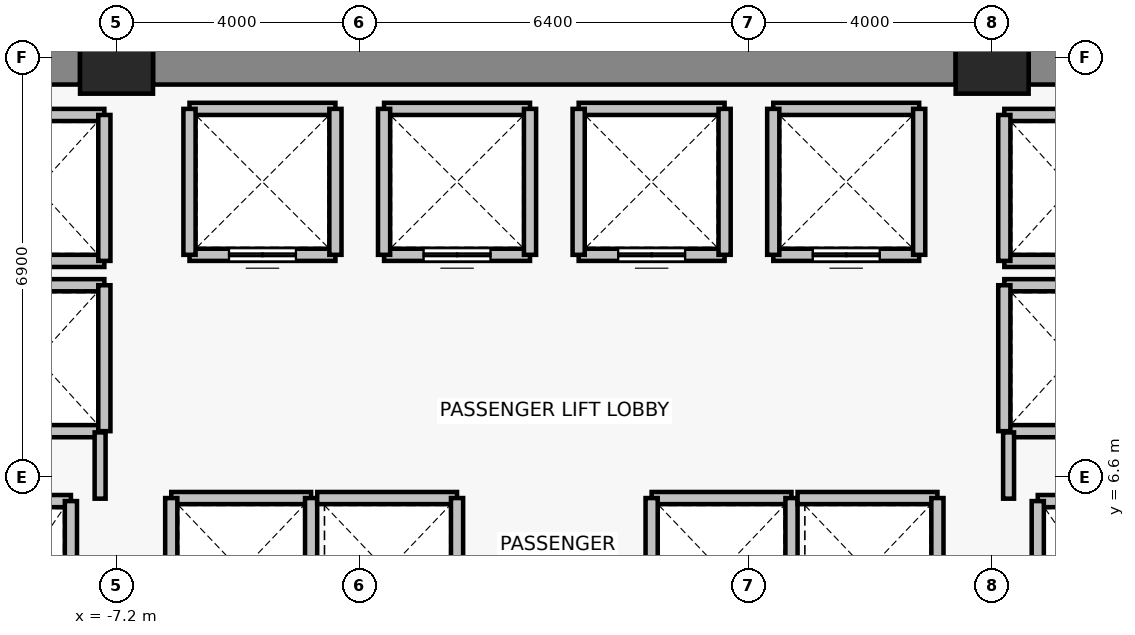
"""IFC4 building model, lengths in metres.
Left out: names, types, materials, properties, quantities, classifications, styles, units other than length and angle.
Written with IfcOpenShell. Run it as: python <this file> out.ifc"""

import sys

from ifc_helpers import new_model, si_unit, direction, frame, frame_2d, origin, origin_2d, place, context, subcontext, project, spatial, rectangle, extrude, source, transform, mapped, element, fill, save


model = new_model("IFC4")
c1 = context("Model", 3, precision=1e-05, world=origin(), true_north=direction((0.0, 1.0)))
c2 = subcontext(c1, "Body", "Model", "MODEL_VIEW")
j1 = project(units=[si_unit("LENGTHUNIT", "METRE"), si_unit("PLANEANGLEUNIT", "RADIAN")], contexts=[c1])
p1 = place(None, origin())
s1 = spatial("IfcSite", under=j1, at=p1, CompositionType="ELEMENT")
p2 = place(p1, origin())
s2 = spatial("IfcBuilding", under=s1, at=p2, CompositionType="ELEMENT")
p3 = place(p2, frame((0.0, 0.0, 67.0)))
s3 = spatial("IfcBuildingStorey", under=s2, at=p3, CompositionType="ELEMENT", Elevation=67.0)
for number, where, z_axis, x_axis in (
    (1, (-7.2, 13.5, 0.0), (0.0, 0.0, 1.0), (1.0, 0.0, 0.0)),
    (2, (7.2, 13.5, 0.0), (0.0, 0.0, 1.0), (1.0, 0.0, 0.0)),
):
    element("IfcColumn", number, at=place(p3, frame(where, z_axis=z_axis, x_axis=x_axis)), inside=s3, PredefinedType="COLUMN", context=c2, shape_type="SweptSolid", body=[
        extrude(rectangle(XDim=1.2, YDim=1.2, at=origin_2d()), origin(), (0.0, 0.0, 1.0), 3.3),
    ])
p4 = place(p3, frame((-13.8, 13.5, 0.0), z_axis=(0.0, 0.0, 1.0), x_axis=(1.0, 0.0, 0.0)))
e3 = element("IfcWall", 3, at=p4, inside=s3, PredefinedType="SHEAR", context=c2, shape_type="SweptSolid", body=[
    extrude(rectangle(XDim=6.0, YDim=0.9, at=frame_2d((3.0, 0.0))), origin(), (0.0, 0.0, 1.0), 3.075),
])
p5 = place(p3, frame((-6.6, 13.5, 0.0), z_axis=(0.0, 0.0, 1.0), x_axis=(1.0, 0.0, 0.0)))
e4 = element("IfcWall", 4, at=p5, inside=s3, PredefinedType="SHEAR", context=c2, shape_type="SweptSolid", body=[
    extrude(rectangle(XDim=13.2, YDim=0.9, at=frame_2d((6.6, 0.0))), origin(), (0.0, 0.0, 1.0), 3.075),
])
p6 = place(p3, frame((7.8, 13.5, 0.0), z_axis=(0.0, 0.0, 1.0), x_axis=(1.0, 0.0, 0.0)))
e5 = element("IfcWall", 5, at=p6, inside=s3, PredefinedType="SHEAR", context=c2, shape_type="SweptSolid", body=[
    extrude(rectangle(XDim=6.0, YDim=0.9, at=frame_2d((3.0, 0.0))), origin(), (0.0, 0.0, 1.0), 3.075),
])
p7 = place(p3, frame((-9.95, 6.2, 0.0), z_axis=(0.0, 0.0, 1.0), x_axis=(1.0, 0.0, 0.0)))
e6 = element("IfcWall", 6, at=p7, inside=s3, PredefinedType="SOLIDWALL", context=c2, shape_type="SweptSolid", body=[
    extrude(rectangle(XDim=2.0, YDim=0.2, at=frame_2d((1.0, 0.0))), origin(), (0.0, 0.0, 1.0), 3.075),
])
p8 = place(p3, frame((-7.95, 6.2, 0.0), z_axis=(0.0, 0.0, 1.0), x_axis=(0.0, -1.0, 0.0)))
e7 = element("IfcWall", 7, at=p8, inside=s3, PredefinedType="SOLIDWALL", context=c2, shape_type="SweptSolid", body=[
    extrude(rectangle(XDim=2.8, YDim=0.2, at=frame_2d((1.4, 0.0))), origin(), (0.0, 0.0, 1.0), 3.075),
])
p9 = place(p3, frame((7.95, 6.2, 0.0), z_axis=(0.0, 0.0, 1.0), x_axis=(1.0, 0.0, 0.0)))
e8 = element("IfcWall", 8, at=p9, inside=s3, PredefinedType="SOLIDWALL", context=c2, shape_type="SweptSolid", body=[
    extrude(rectangle(XDim=2.0, YDim=0.2, at=frame_2d((1.0, 0.0))), origin(), (0.0, 0.0, 1.0), 3.075),
])
p10 = place(p3, frame((7.95, 3.4, 0.0), z_axis=(0.0, 0.0, 1.0), x_axis=(0.0, 1.0, 0.0)))
e9 = element("IfcWall", 9, at=p10, inside=s3, PredefinedType="SOLIDWALL", context=c2, shape_type="SweptSolid", body=[
    extrude(rectangle(XDim=2.8, YDim=0.2, at=frame_2d((1.4, 0.0))), origin(), (0.0, 0.0, 1.0), 3.075),
])
p11 = place(p3, frame((-3.6, 10.25, 0.0), z_axis=(0.0, 0.0, 1.0), x_axis=(-1.0, 0.0, 0.0)))
e10 = element("IfcWall", 10, at=p11, inside=s3, PredefinedType="SOLIDWALL", context=c2, shape_type="SweptSolid", body=[
    extrude(rectangle(XDim=2.4, YDim=0.2, at=frame_2d((1.2, 0.0))), origin(), (0.0, 0.0, 1.0), 3.075),
])
p12 = place(p11, frame((0.65, 0.0, 0.0)))
e11 = element("IfcOpeningElement", 11, at=p12, cuts=e10, PredefinedType="OPENING", context=c2, shape_type="SweptSolid", body=[
    extrude(rectangle(XDim=1.1, YDim=2.2, at=frame_2d((0.55, 1.1))), frame((0.0, 0.11, 0.0), z_axis=(0.0, -1.0, 0.0), x_axis=(1.0, 0.0, 0.0)), (0.0, 0.0, 1.0), 0.22),
])
for number, where, z_axis, x_axis in (
    (12, (-6.0, 12.65, 0.0), (0.0, 0.0, 1.0), (1.0, 0.0, 0.0)),
    (13, (-6.0, 10.25, 0.0), (0.0, 0.0, 1.0), (0.0, 1.0, 0.0)),
    (14, (-3.6, 12.65, 0.0), (0.0, 0.0, 1.0), (0.0, -1.0, 0.0)),
):
    element("IfcWall", number, at=place(p3, frame(where, z_axis=z_axis, x_axis=x_axis)), inside=s3, PredefinedType="SOLIDWALL", context=c2, shape_type="SweptSolid", body=[
        extrude(rectangle(XDim=2.4, YDim=0.2, at=frame_2d((1.2, 0.0))), origin(), (0.0, 0.0, 1.0), 3.075),
    ])
p13 = place(p3, frame((-0.4, 10.25, 0.0), z_axis=(0.0, 0.0, 1.0), x_axis=(-1.0, 0.0, 0.0)))
e15 = element("IfcWall", 15, at=p13, inside=s3, PredefinedType="SOLIDWALL", context=c2, shape_type="SweptSolid", body=[
    extrude(rectangle(XDim=2.4, YDim=0.2, at=frame_2d((1.2, 0.0))), origin(), (0.0, 0.0, 1.0), 3.075),
])
p14 = place(p13, frame((0.65, 0.0, 0.0)))
e16 = element("IfcOpeningElement", 16, at=p14, cuts=e15, PredefinedType="OPENING", context=c2, shape_type="SweptSolid", body=[
    extrude(rectangle(XDim=1.1, YDim=2.2, at=frame_2d((0.55, 1.1))), frame((0.0, 0.11, 0.0), z_axis=(0.0, -1.0, 0.0), x_axis=(1.0, 0.0, 0.0)), (0.0, 0.0, 1.0), 0.22),
])
p15 = place(p3, frame((-2.8, 12.65, 0.0), z_axis=(0.0, 0.0, 1.0), x_axis=(1.0, 0.0, 0.0)))
e17 = element("IfcWall", 17, at=p15, inside=s3, PredefinedType="SOLIDWALL", context=c2, shape_type="SweptSolid", body=[
    extrude(rectangle(XDim=2.4, YDim=0.2, at=frame_2d((1.2, 0.0))), origin(), (0.0, 0.0, 1.0), 3.075),
])
for number, where, z_axis, x_axis in (
    (18, (-2.8, 10.25, 0.0), (0.0, 0.0, 1.0), (0.0, 1.0, 0.0)),
    (19, (-0.4, 12.65, 0.0), (0.0, 0.0, 1.0), (0.0, -1.0, 0.0)),
):
    element("IfcWall", number, at=place(p3, frame(where, z_axis=z_axis, x_axis=x_axis)), inside=s3, PredefinedType="SOLIDWALL", context=c2, shape_type="SweptSolid", body=[
        extrude(rectangle(XDim=2.4, YDim=0.2, at=frame_2d((1.2, 0.0))), origin(), (0.0, 0.0, 1.0), 3.075),
    ])
p16 = place(p3, frame((2.8, 10.25, 0.0), z_axis=(0.0, 0.0, 1.0), x_axis=(-1.0, 0.0, 0.0)))
e20 = element("IfcWall", 20, at=p16, inside=s3, PredefinedType="SOLIDWALL", context=c2, shape_type="SweptSolid", body=[
    extrude(rectangle(XDim=2.4, YDim=0.2, at=frame_2d((1.2, 0.0))), origin(), (0.0, 0.0, 1.0), 3.075),
])
p17 = place(p16, frame((0.65, 0.0, 0.0)))
e21 = element("IfcOpeningElement", 21, at=p17, cuts=e20, PredefinedType="OPENING", context=c2, shape_type="SweptSolid", body=[
    extrude(rectangle(XDim=1.1, YDim=2.2, at=frame_2d((0.55, 1.1))), frame((0.0, 0.11, 0.0), z_axis=(0.0, -1.0, 0.0), x_axis=(1.0, 0.0, 0.0)), (0.0, 0.0, 1.0), 0.22),
])
p18 = place(p3, frame((0.4, 12.65, 0.0), z_axis=(0.0, 0.0, 1.0), x_axis=(1.0, 0.0, 0.0)))
e22 = element("IfcWall", 22, at=p18, inside=s3, PredefinedType="SOLIDWALL", context=c2, shape_type="SweptSolid", body=[
    extrude(rectangle(XDim=2.4, YDim=0.2, at=frame_2d((1.2, 0.0))), origin(), (0.0, 0.0, 1.0), 3.075),
])
for number, where, z_axis, x_axis in (
    (23, (0.4, 10.25, 0.0), (0.0, 0.0, 1.0), (0.0, 1.0, 0.0)),
    (24, (2.8, 12.65, 0.0), (0.0, 0.0, 1.0), (0.0, -1.0, 0.0)),
):
    element("IfcWall", number, at=place(p3, frame(where, z_axis=z_axis, x_axis=x_axis)), inside=s3, PredefinedType="SOLIDWALL", context=c2, shape_type="SweptSolid", body=[
        extrude(rectangle(XDim=2.4, YDim=0.2, at=frame_2d((1.2, 0.0))), origin(), (0.0, 0.0, 1.0), 3.075),
    ])
p19 = place(p3, frame((6.0, 10.25, 0.0), z_axis=(0.0, 0.0, 1.0), x_axis=(-1.0, 0.0, 0.0)))
e25 = element("IfcWall", 25, at=p19, inside=s3, PredefinedType="SOLIDWALL", context=c2, shape_type="SweptSolid", body=[
    extrude(rectangle(XDim=2.4, YDim=0.2, at=frame_2d((1.2, 0.0))), origin(), (0.0, 0.0, 1.0), 3.075),
])
p20 = place(p19, frame((0.65, 0.0, 0.0)))
e26 = element("IfcOpeningElement", 26, at=p20, cuts=e25, PredefinedType="OPENING", context=c2, shape_type="SweptSolid", body=[
    extrude(rectangle(XDim=1.1, YDim=2.2, at=frame_2d((0.55, 1.1))), frame((0.0, 0.11, 0.0), z_axis=(0.0, -1.0, 0.0), x_axis=(1.0, 0.0, 0.0)), (0.0, 0.0, 1.0), 0.22),
])
for number, where, z_axis, x_axis in (
    (27, (3.6, 12.65, 0.0), (0.0, 0.0, 1.0), (1.0, 0.0, 0.0)),
    (28, (3.6, 10.25, 0.0), (0.0, 0.0, 1.0), (0.0, 1.0, 0.0)),
    (29, (6.0, 12.65, 0.0), (0.0, 0.0, 1.0), (0.0, -1.0, 0.0)),
):
    element("IfcWall", number, at=place(p3, frame(where, z_axis=z_axis, x_axis=x_axis)), inside=s3, PredefinedType="SOLIDWALL", context=c2, shape_type="SweptSolid", body=[
        extrude(rectangle(XDim=2.4, YDim=0.2, at=frame_2d((1.2, 0.0))), origin(), (0.0, 0.0, 1.0), 3.075),
    ])
p21 = place(p3, frame((-6.3, 6.25, 0.0), z_axis=(0.0, 0.0, 1.0), x_axis=(1.0, 0.0, 0.0)))
e30 = element("IfcWall", 30, at=p21, inside=s3, PredefinedType="SOLIDWALL", context=c2, shape_type="SweptSolid", body=[
    extrude(rectangle(XDim=2.3, YDim=0.2, at=frame_2d((1.15, 0.0))), origin(), (0.0, 0.0, 1.0), 3.075),
])
for number, where, z_axis, x_axis in (
    (31, (-6.3, 3.85, 0.0), (0.0, 0.0, 1.0), (0.0, 1.0, 0.0)),
    (32, (-4.0, 6.25, 0.0), (0.0, 0.0, 1.0), (0.0, -1.0, 0.0)),
):
    element("IfcWall", number, at=place(p3, frame(where, z_axis=z_axis, x_axis=x_axis)), inside=s3, PredefinedType="SOLIDWALL", context=c2, shape_type="SweptSolid", body=[
        extrude(rectangle(XDim=2.4, YDim=0.2, at=frame_2d((1.2, 0.0))), origin(), (0.0, 0.0, 1.0), 3.075),
    ])
p22 = place(p3, frame((-3.9, 6.25, 0.0), z_axis=(0.0, 0.0, 1.0), x_axis=(1.0, 0.0, 0.0)))
e33 = element("IfcWall", 33, at=p22, inside=s3, PredefinedType="SOLIDWALL", context=c2, shape_type="SweptSolid", body=[
    extrude(rectangle(XDim=2.3, YDim=0.2, at=frame_2d((1.15, 0.0))), origin(), (0.0, 0.0, 1.0), 3.075),
])
p23 = place(p3, frame((-1.6, 6.25, 0.0), z_axis=(0.0, 0.0, 1.0), x_axis=(0.0, -1.0, 0.0)))
e34 = element("IfcWall", 34, at=p23, inside=s3, PredefinedType="SOLIDWALL", context=c2, shape_type="SweptSolid", body=[
    extrude(rectangle(XDim=2.4, YDim=0.2, at=frame_2d((1.2, 0.0))), origin(), (0.0, 0.0, 1.0), 3.075),
])
p24 = place(p3, frame((1.6, 6.25, 0.0), z_axis=(0.0, 0.0, 1.0), x_axis=(1.0, 0.0, 0.0)))
e35 = element("IfcWall", 35, at=p24, inside=s3, PredefinedType="SOLIDWALL", context=c2, shape_type="SweptSolid", body=[
    extrude(rectangle(XDim=2.3, YDim=0.2, at=frame_2d((1.15, 0.0))), origin(), (0.0, 0.0, 1.0), 3.075),
])
for number, where, z_axis, x_axis in (
    (36, (1.6, 3.85, 0.0), (0.0, 0.0, 1.0), (0.0, 1.0, 0.0)),
    (37, (3.9, 6.25, 0.0), (0.0, 0.0, 1.0), (0.0, -1.0, 0.0)),
):
    element("IfcWall", number, at=place(p3, frame(where, z_axis=z_axis, x_axis=x_axis)), inside=s3, PredefinedType="SOLIDWALL", context=c2, shape_type="SweptSolid", body=[
        extrude(rectangle(XDim=2.4, YDim=0.2, at=frame_2d((1.2, 0.0))), origin(), (0.0, 0.0, 1.0), 3.075),
    ])
p25 = place(p3, frame((4.0, 6.25, 0.0), z_axis=(0.0, 0.0, 1.0), x_axis=(1.0, 0.0, 0.0)))
e38 = element("IfcWall", 38, at=p25, inside=s3, PredefinedType="SOLIDWALL", context=c2, shape_type="SweptSolid", body=[
    extrude(rectangle(XDim=2.3, YDim=0.2, at=frame_2d((1.15, 0.0))), origin(), (0.0, 0.0, 1.0), 3.075),
])
p26 = place(p3, frame((6.3, 6.25, 0.0), z_axis=(0.0, 0.0, 1.0), x_axis=(0.0, -1.0, 0.0)))
e39 = element("IfcWall", 39, at=p26, inside=s3, PredefinedType="SOLIDWALL", context=c2, shape_type="SweptSolid", body=[
    extrude(rectangle(XDim=2.4, YDim=0.2, at=frame_2d((1.2, 0.0))), origin(), (0.0, 0.0, 1.0), 3.075),
])
for number, where, z_axis, x_axis in (
    (40, (-7.4, 7.35, 0.0), (0.0, 0.0, 1.0), (-1.0, 0.0, 0.0)),
    (41, (-9.6, 9.75, 0.0), (0.0, 0.0, 1.0), (1.0, 0.0, 0.0)),
):
    element("IfcWall", number, at=place(p3, frame(where, z_axis=z_axis, x_axis=x_axis)), inside=s3, PredefinedType="SOLIDWALL", context=c2, shape_type="SweptSolid", body=[
        extrude(rectangle(XDim=2.2, YDim=0.2, at=frame_2d((1.1, 0.0))), origin(), (0.0, 0.0, 1.0), 2.465),
    ])
p27 = place(p3, frame((-7.4, 9.75, 0.0), z_axis=(0.0, 0.0, 1.0), x_axis=(0.0, -1.0, 0.0)))
e42 = element("IfcWall", 42, at=p27, inside=s3, PredefinedType="SOLIDWALL", context=c2, shape_type="SweptSolid", body=[
    extrude(rectangle(XDim=2.4, YDim=0.2, at=frame_2d((1.2, 0.0))), origin(), (0.0, 0.0, 1.0), 2.465),
])
for number, where, z_axis, x_axis in (
    (43, (-7.4, 10.15, 0.0), (0.0, 0.0, 1.0), (-1.0, 0.0, 0.0)),
    (44, (-9.6, 12.55, 0.0), (0.0, 0.0, 1.0), (1.0, 0.0, 0.0)),
):
    element("IfcWall", number, at=place(p3, frame(where, z_axis=z_axis, x_axis=x_axis)), inside=s3, PredefinedType="SOLIDWALL", context=c2, shape_type="SweptSolid", body=[
        extrude(rectangle(XDim=2.2, YDim=0.2, at=frame_2d((1.1, 0.0))), origin(), (0.0, 0.0, 1.0), 2.465),
    ])
p28 = place(p3, frame((-7.4, 12.55, 0.0), z_axis=(0.0, 0.0, 1.0), x_axis=(0.0, -1.0, 0.0)))
e45 = element("IfcWall", 45, at=p28, inside=s3, PredefinedType="SOLIDWALL", context=c2, shape_type="SweptSolid", body=[
    extrude(rectangle(XDim=2.4, YDim=0.2, at=frame_2d((1.2, 0.0))), origin(), (0.0, 0.0, 1.0), 2.465),
])
for number, where, z_axis, x_axis in (
    (46, (9.6, 7.35, 0.0), (0.0, 0.0, 1.0), (-1.0, 0.0, 0.0)),
    (47, (7.4, 9.75, 0.0), (0.0, 0.0, 1.0), (1.0, 0.0, 0.0)),
):
    element("IfcWall", number, at=place(p3, frame(where, z_axis=z_axis, x_axis=x_axis)), inside=s3, PredefinedType="SOLIDWALL", context=c2, shape_type="SweptSolid", body=[
        extrude(rectangle(XDim=2.2, YDim=0.2, at=frame_2d((1.1, 0.0))), origin(), (0.0, 0.0, 1.0), 2.465),
    ])
p29 = place(p3, frame((7.4, 7.35, 0.0), z_axis=(0.0, 0.0, 1.0), x_axis=(0.0, 1.0, 0.0)))
e48 = element("IfcWall", 48, at=p29, inside=s3, PredefinedType="SOLIDWALL", context=c2, shape_type="SweptSolid", body=[
    extrude(rectangle(XDim=2.4, YDim=0.2, at=frame_2d((1.2, 0.0))), origin(), (0.0, 0.0, 1.0), 2.465),
])
for number, where, z_axis, x_axis in (
    (49, (9.6, 10.15, 0.0), (0.0, 0.0, 1.0), (-1.0, 0.0, 0.0)),
    (50, (7.4, 12.55, 0.0), (0.0, 0.0, 1.0), (1.0, 0.0, 0.0)),
):
    element("IfcWall", number, at=place(p3, frame(where, z_axis=z_axis, x_axis=x_axis)), inside=s3, PredefinedType="SOLIDWALL", context=c2, shape_type="SweptSolid", body=[
        extrude(rectangle(XDim=2.2, YDim=0.2, at=frame_2d((1.1, 0.0))), origin(), (0.0, 0.0, 1.0), 2.465),
    ])
p30 = place(p3, frame((7.4, 10.15, 0.0), z_axis=(0.0, 0.0, 1.0), x_axis=(0.0, 1.0, 0.0)))
e51 = element("IfcWall", 51, at=p30, inside=s3, PredefinedType="SOLIDWALL", context=c2, shape_type="SweptSolid", body=[
    extrude(rectangle(XDim=2.4, YDim=0.2, at=frame_2d((1.2, 0.0))), origin(), (0.0, 0.0, 1.0), 2.465),
])
for number, where, z_axis, x_axis in (
    (52, (-7.47, 7.33, 0.0), (0.0, 0.0, 1.0), (0.0, -1.0, 0.0)),
    (53, (7.47, 6.24, 0.0), (0.0, 0.0, 1.0), (0.0, 1.0, 0.0)),
):
    element("IfcWall", number, at=place(p3, frame(where, z_axis=z_axis, x_axis=x_axis)), inside=s3, PredefinedType="PARTITIONING", context=c2, shape_type="SweptSolid", body=[
        extrude(rectangle(XDim=1.09, YDim=0.18, at=frame_2d((0.545, 0.0))), origin(), (0.0, 0.0, 1.0), 2.465),
    ])
m1 = source(origin(), c2, "Body", "SweptSolid", [
    extrude(rectangle(XDim=1.1, YDim=2.2, at=frame_2d((0.55, 1.1))), frame((0.0, 0.025, 0.0), z_axis=(0.0, -1.0, 0.0), x_axis=(1.0, 0.0, 0.0)), (0.0, 0.0, 1.0), 0.05),
])
p31 = place(p12, origin())
e54 = element("IfcDoor", 54, at=p31, inside=s3, OperationType="DOUBLE_DOOR_SLIDING", PredefinedType="DOOR", context=c2, shape_type="MappedRepresentation", body=[
    mapped(m1, transform((0.0, 0.0, 0.0), x_axis=(1.0, 0.0, 0.0), y_axis=(0.0, 1.0, 0.0), z_axis=(0.0, 0.0, 1.0), scale=1.0)),
])
fill(e11, e54)
p32 = place(p14, origin())
e55 = element("IfcDoor", 55, at=p32, inside=s3, OperationType="DOUBLE_DOOR_SLIDING", PredefinedType="DOOR", context=c2, shape_type="MappedRepresentation", body=[
    mapped(m1, transform((0.0, 0.0, 0.0), x_axis=(1.0, 0.0, 0.0), y_axis=(0.0, 1.0, 0.0), z_axis=(0.0, 0.0, 1.0), scale=1.0)),
])
fill(e16, e55)
p33 = place(p17, origin())
e56 = element("IfcDoor", 56, at=p33, inside=s3, OperationType="DOUBLE_DOOR_SLIDING", PredefinedType="DOOR", context=c2, shape_type="MappedRepresentation", body=[
    mapped(m1, transform((0.0, 0.0, 0.0), x_axis=(1.0, 0.0, 0.0), y_axis=(0.0, 1.0, 0.0), z_axis=(0.0, 0.0, 1.0), scale=1.0)),
])
fill(e21, e56)
p34 = place(p20, origin())
e57 = element("IfcDoor", 57, at=p34, inside=s3, OperationType="DOUBLE_DOOR_SLIDING", PredefinedType="DOOR", context=c2, shape_type="MappedRepresentation", body=[
    mapped(m1, transform((0.0, 0.0, 0.0), x_axis=(1.0, 0.0, 0.0), y_axis=(0.0, 1.0, 0.0), z_axis=(0.0, 0.0, 1.0), scale=1.0)),
])
fill(e26, e57)
save(model, sys.argv[1])
